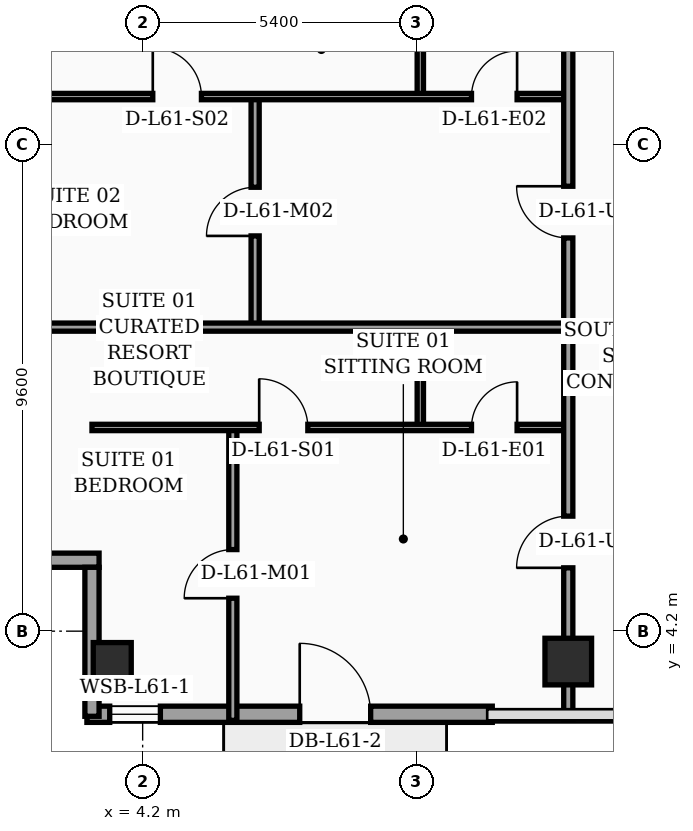
"""IFC4 building model, lengths in metres.
Left out: names, types, materials, properties, quantities, classifications, styles, units other than length and angle.
Written with IfcOpenShell. Run it as: python <this file> out.ifc"""

import sys

from ifc_helpers import new_model, si_unit, direction, frame, frame_2d, origin, origin_2d, place, context, subcontext, project, spatial, rectangle, hollow_rectangle, extrude, element, fill, save


model = new_model("IFC4")
c1 = context("Model", 3, precision=1e-05, world=origin(), true_north=direction((0.0, 1.0)))
c2 = subcontext(c1, "Body", "Model", "MODEL_VIEW")
j1 = project(units=[si_unit("LENGTHUNIT", "METRE"), si_unit("PLANEANGLEUNIT", "RADIAN")], contexts=[c1])
p1 = place(None, origin())
s1 = spatial("IfcSite", under=j1, at=p1, CompositionType="ELEMENT")
p2 = place(p1, origin())
s2 = spatial("IfcBuilding", under=s1, at=p2, CompositionType="ELEMENT")
p3 = place(p2, frame((0.0, 0.0, 247.6)))
s3 = spatial("IfcBuildingStorey", under=s2, at=p3, CompositionType="ELEMENT", Elevation=247.6)
p4 = place(p3, frame((3.6, 3.6, 0.0), z_axis=(0.0, 0.0, 1.0), x_axis=(1.0, 0.0, 0.0)))
e1 = element("IfcColumn", 1, at=p4, inside=s3, PredefinedType="COLUMN", context=c2, shape_type="SweptSolid", body=[
    extrude(hollow_rectangle(XDim=0.75, YDim=0.75, WallThickness=0.032, at=origin_2d()), origin(), (0.0, 0.0, 1.0), 3.56),
])
p5 = place(p3, frame((12.6, 3.6, 0.0), z_axis=(0.0, 0.0, 1.0), x_axis=(1.0, 0.0, 0.0)))
e2 = element("IfcColumn", 2, at=p5, inside=s3, PredefinedType="COLUMN", context=c2, shape_type="SweptSolid", body=[
    extrude(rectangle(XDim=0.92, YDim=0.92, at=origin_2d()), origin(), (0.0, 0.0, 1.0), 3.56),
])
p6 = place(p3, frame((3.1, 2.56, 0.0), z_axis=(0.0, 0.0, 1.0), x_axis=(1.0, 0.0, 0.0)))
e3 = element("IfcWall", 3, at=p6, inside=s3, PredefinedType="SOLIDWALL", context=c2, shape_type="SweptSolid", body=[
    extrude(rectangle(XDim=8.0, YDim=0.32, at=frame_2d((4.0, 0.0))), origin(), (0.0, 0.0, 1.0), 3.56),
])
p7 = place(p6, frame((0.45, 0.0, 0.75)))
e4 = element("IfcOpeningElement", 4, at=p7, cuts=e3, PredefinedType="OPENING", context=c2, shape_type="SweptSolid", body=[
    extrude(rectangle(XDim=1.0, YDim=1.6, at=frame_2d((0.5, 0.8))), frame((0.0, 0.17, 0.0), z_axis=(0.0, -1.0, 0.0), x_axis=(1.0, 0.0, 0.0)), (0.0, 0.0, 1.0), 0.34),
])
p8 = place(p6, frame((4.2, 0.0, 0.0)))
e5 = element("IfcOpeningElement", 5, at=p8, cuts=e3, PredefinedType="OPENING", context=c2, shape_type="SweptSolid", body=[
    extrude(rectangle(XDim=1.4, YDim=2.25, at=frame_2d((0.7, 1.125))), frame((0.0, 0.17, 0.0), z_axis=(0.0, -1.0, 0.0), x_axis=(1.0, 0.0, 0.0)), (0.0, 0.0, 1.0), 0.34),
])
p9 = place(p3, frame((0.12, 5.6, 0.0), z_axis=(0.0, 0.0, 1.0), x_axis=(1.0, 0.0, 0.0)))
e6 = element("IfcWall", 6, at=p9, inside=s3, PredefinedType="SOLIDWALL", context=c2, shape_type="SweptSolid", body=[
    extrude(rectangle(XDim=3.22, YDim=0.28, at=frame_2d((1.61, 0.0))), origin(), (0.0, 0.0, 1.0), 2.99),
])
p10 = place(p3, frame((3.2, 5.46, 0.0), z_axis=(0.0, 0.0, 1.0), x_axis=(0.0, -1.0, 0.0)))
e7 = element("IfcWall", 7, at=p10, inside=s3, PredefinedType="SOLIDWALL", context=c2, shape_type="SweptSolid", body=[
    extrude(rectangle(XDim=2.94, YDim=0.28, at=frame_2d((1.47, 0.0))), origin(), (0.0, 0.0, 1.0), 2.99),
])
p11 = place(p3, frame((9.68, 8.22, 0.0), z_axis=(0.0, 0.0, 1.0), x_axis=(0.0, 1.0, 0.0)))
e8 = element("IfcWall", 8, at=p11, inside=s3, PredefinedType="PARTITIONING", context=c2, shape_type="SweptSolid", body=[
    extrude(rectangle(XDim=1.98, YDim=0.125, at=frame_2d((0.99, 0.0))), origin(), (0.0, 0.0, 1.0), 3.09),
])
p12 = place(p3, frame((5.98, 2.44, 0.0), z_axis=(0.0, 0.0, 1.0), x_axis=(0.0, 1.0, 0.0)))
e9 = element("IfcWall", 9, at=p12, inside=s3, PredefinedType="PARTITIONING", context=c2, shape_type="SweptSolid", body=[
    extrude(rectangle(XDim=5.78, YDim=0.16, at=frame_2d((2.89, 0.0))), origin(), (0.0, 0.0, 1.0), 3.09),
])
p13 = place(p12, frame((2.41, 0.0, 0.0)))
e10 = element("IfcOpeningElement", 10, at=p13, cuts=e9, PredefinedType="OPENING", context=c2, shape_type="SweptSolid", body=[
    extrude(rectangle(XDim=0.96, YDim=2.2, at=frame_2d((0.48, 1.1))), frame((0.0, 0.09, 0.0), z_axis=(0.0, -1.0, 0.0), x_axis=(1.0, 0.0, 0.0)), (0.0, 0.0, 1.0), 0.18),
])
p14 = place(p3, frame((3.2, 8.22, 0.0), z_axis=(0.0, 0.0, 1.0), x_axis=(1.0, 0.0, 0.0)))
e11 = element("IfcWall", 11, at=p14, inside=s3, PredefinedType="PARTITIONING", context=c2, shape_type="SweptSolid", body=[
    extrude(rectangle(XDim=9.4, YDim=0.125, at=frame_2d((4.7, 0.0))), origin(), (0.0, 0.0, 1.0), 2.99),
])
p15 = place(p14, frame((3.3, 0.0, 0.0)))
e12 = element("IfcOpeningElement", 12, at=p15, cuts=e11, PredefinedType="OPENING", context=c2, shape_type="SweptSolid", body=[
    extrude(rectangle(XDim=0.96, YDim=2.2, at=frame_2d((0.48, 1.1))), frame((0.0, 0.073, 0.0), z_axis=(0.0, -1.0, 0.0), x_axis=(1.0, 0.0, 0.0)), (0.0, 0.0, 1.0), 0.145),
])
p16 = place(p14, frame((7.49, 0.0, 0.0)))
e13 = element("IfcOpeningElement", 13, at=p16, cuts=e11, PredefinedType="OPENING", context=c2, shape_type="SweptSolid", body=[
    extrude(rectangle(XDim=0.9, YDim=2.15, at=frame_2d((0.45, 1.075))), frame((0.0, 0.073, 0.0), z_axis=(0.0, -1.0, 0.0), x_axis=(1.0, 0.0, 0.0)), (0.0, 0.0, 1.0), 0.145),
])
p17 = place(p3, frame((9.68, 14.75, 0.0), z_axis=(0.0, 0.0, 1.0), x_axis=(0.0, 1.0, 0.0)))
e14 = element("IfcWall", 14, at=p17, inside=s3, PredefinedType="PARTITIONING", context=c2, shape_type="SweptSolid", body=[
    extrude(rectangle(XDim=2.05, YDim=0.125, at=frame_2d((1.025, 0.0))), origin(), (0.0, 0.0, 1.0), 3.56),
])
p18 = place(p3, frame((6.42, 10.2, 0.0), z_axis=(0.0, 0.0, 1.0), x_axis=(0.0, 1.0, 0.0)))
e15 = element("IfcWall", 15, at=p18, inside=s3, PredefinedType="PARTITIONING", context=c2, shape_type="SweptSolid", body=[
    extrude(rectangle(XDim=4.55, YDim=0.16, at=frame_2d((2.275, 0.0))), origin(), (0.0, 0.0, 1.0), 3.14),
])
p19 = place(p18, frame((1.8, 0.0, 0.0)))
e16 = element("IfcOpeningElement", 16, at=p19, cuts=e15, PredefinedType="OPENING", context=c2, shape_type="SweptSolid", body=[
    extrude(rectangle(XDim=0.96, YDim=2.2, at=frame_2d((0.48, 1.1))), frame((0.0, 0.09, 0.0), z_axis=(0.0, -1.0, 0.0), x_axis=(1.0, 0.0, 0.0)), (0.0, 0.0, 1.0), 0.18),
])
p20 = place(p3, frame((0.08, 14.75, 0.0), z_axis=(0.0, 0.0, 1.0), x_axis=(1.0, 0.0, 0.0)))
e17 = element("IfcWall", 17, at=p20, inside=s3, PredefinedType="PARTITIONING", context=c2, shape_type="SweptSolid", body=[
    extrude(rectangle(XDim=12.52, YDim=0.125, at=frame_2d((6.26, 0.0))), origin(), (0.0, 0.0, 1.0), 2.99),
])
p21 = place(p20, frame((4.32, 0.0, 0.0)))
e18 = element("IfcOpeningElement", 18, at=p21, cuts=e17, PredefinedType="OPENING", context=c2, shape_type="SweptSolid", body=[
    extrude(rectangle(XDim=0.96, YDim=2.2, at=frame_2d((0.48, 1.1))), frame((0.0, 0.073, 0.0), z_axis=(0.0, -1.0, 0.0), x_axis=(1.0, 0.0, 0.0)), (0.0, 0.0, 1.0), 0.145),
])
p22 = place(p20, frame((10.61, 0.0, 0.0)))
e19 = element("IfcOpeningElement", 19, at=p22, cuts=e17, PredefinedType="OPENING", context=c2, shape_type="SweptSolid", body=[
    extrude(rectangle(XDim=0.9, YDim=2.15, at=frame_2d((0.45, 1.075))), frame((0.0, 0.073, 0.0), z_axis=(0.0, -1.0, 0.0), x_axis=(1.0, 0.0, 0.0)), (0.0, 0.0, 1.0), 0.145),
])
p23 = place(p3, frame((0.08, 10.2, 0.0), z_axis=(0.0, 0.0, 1.0), x_axis=(1.0, 0.0, 0.0)))
e20 = element("IfcWall", 20, at=p23, inside=s3, PredefinedType="PARTITIONING", context=c2, shape_type="SweptSolid", body=[
    extrude(rectangle(XDim=12.52, YDim=0.16, at=frame_2d((6.26, 0.0))), origin(), (0.0, 0.0, 1.0), 2.99),
])
p24 = place(p3, frame((12.6, 2.44, 0.0), z_axis=(0.0, 0.0, 1.0), x_axis=(0.0, 1.0, 0.0)))
e21 = element("IfcWall", 21, at=p24, inside=s3, PredefinedType="PARTITIONING", context=c2, shape_type="SweptSolid", body=[
    extrude(rectangle(XDim=14.36, YDim=0.18, at=frame_2d((7.18, 0.0))), origin(), (0.0, 0.0, 1.0), 2.99),
])
p25 = place(p24, frame((3.01, 0.0, 0.0)))
e22 = element("IfcOpeningElement", 22, at=p25, cuts=e21, PredefinedType="OPENING", context=c2, shape_type="SweptSolid", body=[
    extrude(rectangle(XDim=1.02, YDim=2.2, at=frame_2d((0.51, 1.1))), frame((0.0, 0.1, 0.0), z_axis=(0.0, -1.0, 0.0), x_axis=(1.0, 0.0, 0.0)), (0.0, 0.0, 1.0), 0.2),
])
p26 = place(p24, frame((9.52, 0.0, 0.0)))
e23 = element("IfcOpeningElement", 23, at=p26, cuts=e21, PredefinedType="OPENING", context=c2, shape_type="SweptSolid", body=[
    extrude(rectangle(XDim=1.02, YDim=2.2, at=frame_2d((0.51, 1.1))), frame((0.0, 0.1, 0.0), z_axis=(0.0, -1.0, 0.0), x_axis=(1.0, 0.0, 0.0)), (0.0, 0.0, 1.0), 0.2),
])
p27 = place(p7, origin())
e24 = element("IfcWindow", 24, at=p27, inside=s3, PartitioningType="SINGLE_PANEL", PredefinedType="WINDOW", context=c2, shape_type="SweptSolid", body=[
    extrude(rectangle(XDim=1.0, YDim=1.6, at=frame_2d((0.5, 0.8))), frame((0.0, 0.03, 0.0), z_axis=(0.0, -1.0, 0.0), x_axis=(1.0, 0.0, 0.0)), (0.0, 0.0, 1.0), 0.06),
])
fill(e4, e24)
p28 = place(p8, origin())
e25 = element("IfcDoor", 25, at=p28, inside=s3, OperationType="SINGLE_SWING_LEFT", PredefinedType="DOOR", context=c2, shape_type="SweptSolid", body=[
    extrude(rectangle(XDim=1.4, YDim=2.25, at=frame_2d((0.7, 1.125))), frame((0.0, 0.025, 0.0), z_axis=(0.0, -1.0, 0.0), x_axis=(1.0, 0.0, 0.0)), (0.0, 0.0, 1.0), 0.05),
])
fill(e5, e25)
p29 = place(p13, origin())
e26 = element("IfcDoor", 26, at=p29, inside=s3, OperationType="SINGLE_SWING_LEFT", PredefinedType="DOOR", context=c2, shape_type="SweptSolid", body=[
    extrude(rectangle(XDim=0.96, YDim=2.2, at=frame_2d((0.48, 1.1))), frame((0.0, 0.025, 0.0), z_axis=(0.0, -1.0, 0.0), x_axis=(1.0, 0.0, 0.0)), (0.0, 0.0, 1.0), 0.05),
])
fill(e10, e26)
p30 = place(p15, origin())
e27 = element("IfcDoor", 27, at=p30, inside=s3, OperationType="SINGLE_SWING_LEFT", PredefinedType="DOOR", context=c2, shape_type="SweptSolid", body=[
    extrude(rectangle(XDim=0.96, YDim=2.2, at=frame_2d((0.48, 1.1))), frame((0.0, 0.025, 0.0), z_axis=(0.0, -1.0, 0.0), x_axis=(1.0, 0.0, 0.0)), (0.0, 0.0, 1.0), 0.05),
])
fill(e12, e27)
p31 = place(p16, origin())
e28 = element("IfcDoor", 28, at=p31, inside=s3, OperationType="SINGLE_SWING_RIGHT", PredefinedType="DOOR", context=c2, shape_type="SweptSolid", body=[
    extrude(rectangle(XDim=0.9, YDim=2.15, at=frame_2d((0.45, 1.075))), frame((0.0, 0.025, 0.0), z_axis=(0.0, -1.0, 0.0), x_axis=(1.0, 0.0, 0.0)), (0.0, 0.0, 1.0), 0.05),
])
fill(e13, e28)
p32 = place(p19, origin())
e29 = element("IfcDoor", 29, at=p32, inside=s3, OperationType="SINGLE_SWING_LEFT", PredefinedType="DOOR", context=c2, shape_type="SweptSolid", body=[
    extrude(rectangle(XDim=0.96, YDim=2.2, at=frame_2d((0.48, 1.1))), frame((0.0, 0.025, 0.0), z_axis=(0.0, -1.0, 0.0), x_axis=(1.0, 0.0, 0.0)), (0.0, 0.0, 1.0), 0.05),
])
fill(e16, e29)
p33 = place(p21, origin())
e30 = element("IfcDoor", 30, at=p33, inside=s3, OperationType="SINGLE_SWING_LEFT", PredefinedType="DOOR", context=c2, shape_type="SweptSolid", body=[
    extrude(rectangle(XDim=0.96, YDim=2.2, at=frame_2d((0.48, 1.1))), frame((0.0, 0.025, 0.0), z_axis=(0.0, -1.0, 0.0), x_axis=(1.0, 0.0, 0.0)), (0.0, 0.0, 1.0), 0.05),
])
fill(e18, e30)
p34 = place(p22, origin())
e31 = element("IfcDoor", 31, at=p34, inside=s3, OperationType="SINGLE_SWING_RIGHT", PredefinedType="DOOR", context=c2, shape_type="SweptSolid", body=[
    extrude(rectangle(XDim=0.9, YDim=2.15, at=frame_2d((0.45, 1.075))), frame((0.0, 0.025, 0.0), z_axis=(0.0, -1.0, 0.0), x_axis=(1.0, 0.0, 0.0)), (0.0, 0.0, 1.0), 0.05),
])
fill(e19, e31)
p35 = place(p25, origin())
e32 = element("IfcDoor", 32, at=p35, inside=s3, OperationType="SINGLE_SWING_LEFT", PredefinedType="DOOR", context=c2, shape_type="SweptSolid", body=[
    extrude(rectangle(XDim=1.02, YDim=2.2, at=frame_2d((0.51, 1.1))), frame((0.0, 0.025, 0.0), z_axis=(0.0, -1.0, 0.0), x_axis=(1.0, 0.0, 0.0)), (0.0, 0.0, 1.0), 0.05),
])
fill(e22, e32)
p36 = place(p26, origin())
e33 = element("IfcDoor", 33, at=p36, inside=s3, OperationType="SINGLE_SWING_RIGHT", PredefinedType="DOOR", context=c2, shape_type="SweptSolid", body=[
    extrude(rectangle(XDim=1.02, YDim=2.2, at=frame_2d((0.51, 1.1))), frame((0.0, 0.025, 0.0), z_axis=(0.0, -1.0, 0.0), x_axis=(1.0, 0.0, 0.0)), (0.0, 0.0, 1.0), 0.05),
])
fill(e23, e33)
save(model, sys.argv[1])
